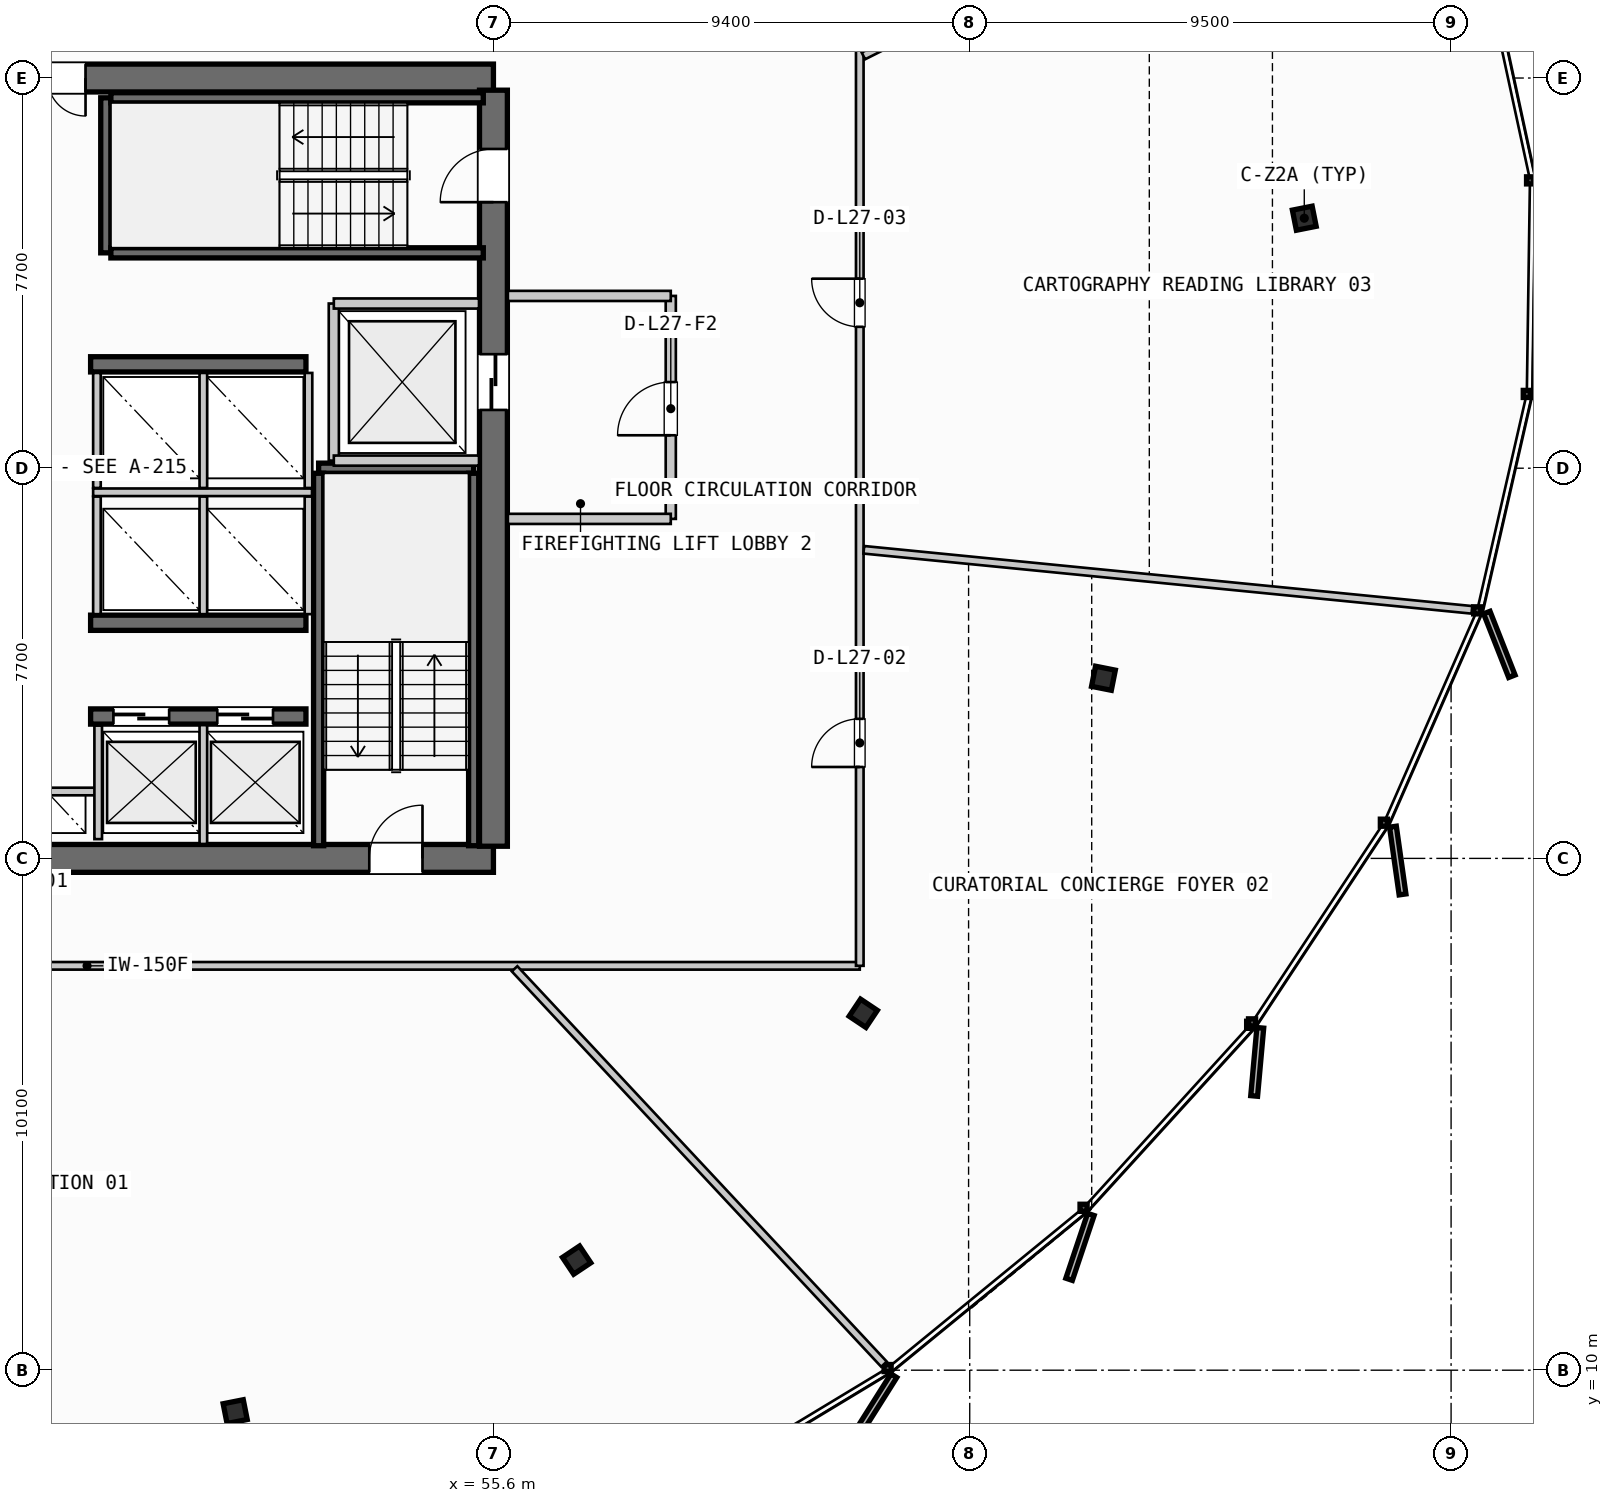
"""IFC4 building model, lengths in metres.
Left out: names, types, materials, properties, quantities, classifications, styles, units other than length and angle.
Written with IfcOpenShell. Run it as: python <this file> out.ifc"""

import sys

from ifc_helpers import new_model, si_unit, direction, frame, frame_2d, origin, origin_2d, place, context, subcontext, project, spatial, rectangle, i_section, extrude, source, transform, mapped, element, fill, save


model = new_model("IFC4")
c1 = context("Model", 3, precision=1e-05, world=origin(), true_north=direction((0.0, 1.0)))
c2 = subcontext(c1, "Body", "Model", "MODEL_VIEW")
j1 = project(units=[si_unit("LENGTHUNIT", "METRE"), si_unit("PLANEANGLEUNIT", "RADIAN")], contexts=[c1])
p1 = place(None, origin())
s1 = spatial("IfcSite", under=j1, at=p1, CompositionType="ELEMENT")
p2 = place(p1, origin())
s2 = spatial("IfcBuilding", under=s1, at=p2, CompositionType="ELEMENT")
p3 = place(p2, frame((0.0, 0.0, 110.8)))
s3 = spatial("IfcBuildingStorey", under=s2, at=p3, CompositionType="ELEMENT", Elevation=110.8)
p4 = place(p3, frame((38.0, 20.1, 0.0), z_axis=(0.0, 0.0, 1.0), x_axis=(1.0, 0.0, 0.0)))
e1 = element("IfcWall", 1, at=p4, inside=s3, PredefinedType="SHEAR", context=c2, shape_type="SweptSolid", body=[
    extrude(rectangle(XDim=17.6, YDim=0.55, at=frame_2d((8.8, 0.0))), origin(), (0.0, 0.0, 1.0), 3.35),
])
p5 = place(p4, frame((1.4, 0.0, 0.0)))
e2 = element("IfcOpeningElement", 2, at=p5, cuts=e1, PredefinedType="OPENING", context=c2, shape_type="SweptSolid", body=[
    extrude(rectangle(XDim=1.05, YDim=2.15, at=frame_2d((0.525, 1.075))), frame((0.0, 0.285, 0.0), z_axis=(0.0, -1.0, 0.0), x_axis=(1.0, 0.0, 0.0)), (0.0, 0.0, 1.0), 0.57),
])
p6 = place(p4, frame((15.15, 0.0, 0.0)))
e3 = element("IfcOpeningElement", 3, at=p6, cuts=e1, PredefinedType="OPENING", context=c2, shape_type="SweptSolid", body=[
    extrude(rectangle(XDim=1.05, YDim=2.15, at=frame_2d((0.525, 1.075))), frame((0.0, 0.285, 0.0), z_axis=(0.0, -1.0, 0.0), x_axis=(1.0, 0.0, 0.0)), (0.0, 0.0, 1.0), 0.57),
])
p7 = place(p3, frame((55.6, 35.5, 0.0), z_axis=(0.0, 0.0, 1.0), x_axis=(-1.0, 0.0, 0.0)))
e4 = element("IfcWall", 4, at=p7, inside=s3, PredefinedType="SHEAR", context=c2, shape_type="SweptSolid", body=[
    extrude(rectangle(XDim=17.6, YDim=0.55, at=frame_2d((8.8, 0.0))), origin(), (0.0, 0.0, 1.0), 3.35),
])
p8 = place(p7, frame((8.05, 0.0, 0.0)))
e5 = element("IfcOpeningElement", 5, at=p8, cuts=e4, PredefinedType="OPENING", context=c2, shape_type="SweptSolid", body=[
    extrude(rectangle(XDim=1.5, YDim=2.2, at=frame_2d((0.75, 1.1))), frame((0.0, 0.285, 0.0), z_axis=(0.0, -1.0, 0.0), x_axis=(1.0, 0.0, 0.0)), (0.0, 0.0, 1.0), 0.57),
])
p9 = place(p7, frame((14.95, 0.0, 0.0)))
e6 = element("IfcOpeningElement", 6, at=p9, cuts=e4, PredefinedType="OPENING", context=c2, shape_type="SweptSolid", body=[
    extrude(rectangle(XDim=1.4, YDim=2.3, at=frame_2d((0.7, 1.15))), frame((0.0, 0.285, 0.0), z_axis=(0.0, -1.0, 0.0), x_axis=(1.0, 0.0, 0.0)), (0.0, 0.0, 1.0), 0.57),
])
p10 = place(p7, frame((12.9, 0.0, 0.0)))
e7 = element("IfcOpeningElement", 7, at=p10, cuts=e4, PredefinedType="OPENING", context=c2, shape_type="SweptSolid", body=[
    extrude(rectangle(XDim=0.9, YDim=2.15, at=frame_2d((0.45, 1.075))), frame((0.0, 0.285, 0.0), z_axis=(0.0, -1.0, 0.0), x_axis=(1.0, 0.0, 0.0)), (0.0, 0.0, 1.0), 0.57),
])
p11 = place(p7, frame((10.6, 0.0, 0.0)))
e8 = element("IfcOpeningElement", 8, at=p11, cuts=e4, PredefinedType="OPENING", context=c2, shape_type="SweptSolid", body=[
    extrude(rectangle(XDim=0.95, YDim=2.15, at=frame_2d((0.475, 1.075))), frame((0.0, 0.285, 0.0), z_axis=(0.0, -1.0, 0.0), x_axis=(1.0, 0.0, 0.0)), (0.0, 0.0, 1.0), 0.57),
])
p12 = place(p3, frame((55.6, 20.34, 0.0), z_axis=(0.0, 0.0, 1.0), x_axis=(0.0, 1.0, 0.0)))
e9 = element("IfcWall", 9, at=p12, inside=s3, PredefinedType="SHEAR", context=c2, shape_type="SweptSolid", body=[
    extrude(rectangle(XDim=14.92, YDim=0.55, at=frame_2d((7.46, 0.0))), origin(), (0.0, 0.0, 1.0), 3.35),
])
p13 = place(p12, frame((12.71, 0.0, 0.0)))
e10 = element("IfcOpeningElement", 10, at=p13, cuts=e9, PredefinedType="OPENING", context=c2, shape_type="SweptSolid", body=[
    extrude(rectangle(XDim=1.05, YDim=2.15, at=frame_2d((0.525, 1.075))), frame((0.0, 0.285, 0.0), z_axis=(0.0, -1.0, 0.0), x_axis=(1.0, 0.0, 0.0)), (0.0, 0.0, 1.0), 0.57),
])
p14 = place(p12, frame((8.61, 0.0, 0.0)))
e11 = element("IfcOpeningElement", 11, at=p14, cuts=e9, PredefinedType="OPENING", context=c2, shape_type="SweptSolid", body=[
    extrude(rectangle(XDim=1.1, YDim=2.2, at=frame_2d((0.55, 1.1))), frame((0.0, 0.285, 0.0), z_axis=(0.0, -1.0, 0.0), x_axis=(1.0, 0.0, 0.0)), (0.0, 0.0, 1.0), 0.57),
])
p15 = place(p3, frame((47.65, 22.9, 0.0), z_axis=(0.0, 0.0, 1.0), x_axis=(1.0, 0.0, 0.0)))
e12 = element("IfcWall", 12, at=p15, inside=s3, PredefinedType="SHEAR", context=c2, shape_type="SweptSolid", body=[
    extrude(rectangle(XDim=4.25, YDim=0.3, at=frame_2d((2.125, 0.0))), origin(), (0.0, 0.0, 1.0), 3.35),
])
p16 = place(p15, frame((0.45, 0.0, 0.0)))
e13 = element("IfcOpeningElement", 13, at=p16, cuts=e12, PredefinedType="OPENING", context=c2, shape_type="SweptSolid", body=[
    extrude(rectangle(XDim=1.1, YDim=2.2, at=frame_2d((0.55, 1.1))), frame((0.0, 0.16, 0.0), z_axis=(0.0, -1.0, 0.0), x_axis=(1.0, 0.0, 0.0)), (0.0, 0.0, 1.0), 0.32),
])
p17 = place(p15, frame((2.5, 0.0, 0.0)))
e14 = element("IfcOpeningElement", 14, at=p17, cuts=e12, PredefinedType="OPENING", context=c2, shape_type="SweptSolid", body=[
    extrude(rectangle(XDim=1.1, YDim=2.2, at=frame_2d((0.55, 1.1))), frame((0.0, 0.16, 0.0), z_axis=(0.0, -1.0, 0.0), x_axis=(1.0, 0.0, 0.0)), (0.0, 0.0, 1.0), 0.32),
])
for number, where, z_axis, x_axis in (
    (15, (47.65, 24.75, 0.0), (0.0, 0.0, 1.0), (1.0, 0.0, 0.0)),
    (16, (47.65, 29.85, 0.0), (0.0, 0.0, 1.0), (1.0, 0.0, 0.0)),
):
    element("IfcWall", number, at=place(p3, frame(where, z_axis=z_axis, x_axis=x_axis)), inside=s3, PredefinedType="SHEAR", context=c2, shape_type="SweptSolid", body=[
        extrude(rectangle(XDim=4.25, YDim=0.3, at=frame_2d((2.125, 0.0))), origin(), (0.0, 0.0, 1.0), 3.35),
    ])
m1 = source(origin(), c2, "Body", "SweptSolid", [
    extrude(i_section(OverallWidth=0.405, OverallDepth=0.398, WebThickness=0.035, FlangeThickness=0.056, FilletRadius=0.015, at=origin_2d()), origin(), (0.0, 0.0, 1.0), 3.35),
])
for number, where, z_axis, x_axis in (
    (17, (71.603, 32.733, 0.0), (0.0, 0.0, 1.0), (0.981, 0.195, 0.0)),
    (18, (50.503, 9.182, 0.0), (0.0, 0.0, 1.0), (0.195, -0.981, 0.0)),
    (19, (57.242, 12.172, 0.0), (0.0, 0.0, 1.0), (0.556, -0.831, 0.0)),
    (20, (62.899, 17.043, 0.0), (0.0, 0.0, 1.0), (0.831, -0.556, 0.0)),
    (21, (67.639, 23.655, 0.0), (0.0, 0.0, 1.0), (0.981, -0.195, 0.0)),
):
    element("IfcColumn", number, at=place(p3, frame(where, z_axis=z_axis, x_axis=x_axis)), inside=s3, PredefinedType="COLUMN", context=c2, shape_type="MappedRepresentation", body=[
        mapped(m1, transform((0.0, 0.0, 0.0), scale=1.0)),
    ])
p18 = place(p3, frame((52.15, 27.8, 0.0), z_axis=(0.0, 0.0, 1.0), x_axis=(1.0, 0.0, 0.0)))
e22 = element("IfcWall", 22, at=p18, inside=s3, PredefinedType="SHEAR", context=c2, shape_type="SweptSolid", body=[
    extrude(rectangle(XDim=3.06, YDim=0.2, at=frame_2d((1.53, 0.0))), origin(), (0.0, 0.0, 1.0), 3.35),
])
for number, where, z_axis, x_axis in (
    (23, (55.21, 27.7, 0.0), (0.0, 0.0, 1.0), (0.0, -1.0, 0.0)),
    (24, (52.15, 20.35, 0.0), (0.0, 0.0, 1.0), (0.0, 1.0, 0.0)),
):
    element("IfcWall", number, at=place(p3, frame(where, z_axis=z_axis, x_axis=x_axis)), inside=s3, PredefinedType="SHEAR", context=c2, shape_type="SweptSolid", body=[
        extrude(rectangle(XDim=7.35, YDim=0.2, at=frame_2d((3.675, 0.0))), origin(), (0.0, 0.0, 1.0), 3.35),
    ])
p19 = place(p3, frame((47.95, 32.05, 0.0), z_axis=(0.0, 0.0, 1.0), x_axis=(0.0, 1.0, 0.0)))
e25 = element("IfcWall", 25, at=p19, inside=s3, PredefinedType="SHEAR", context=c2, shape_type="SweptSolid", body=[
    extrude(rectangle(XDim=3.06, YDim=0.2, at=frame_2d((1.53, 0.0))), origin(), (0.0, 0.0, 1.0), 3.35),
])
for number, where, z_axis, x_axis in (
    (26, (48.05, 35.11, 0.0), (0.0, 0.0, 1.0), (1.0, 0.0, 0.0)),
    (27, (55.4, 32.05, 0.0), (0.0, 0.0, 1.0), (-1.0, 0.0, 0.0)),
):
    element("IfcWall", number, at=place(p3, frame(where, z_axis=z_axis, x_axis=x_axis)), inside=s3, PredefinedType="SHEAR", context=c2, shape_type="SweptSolid", body=[
        extrude(rectangle(XDim=7.35, YDim=0.2, at=frame_2d((3.675, 0.0))), origin(), (0.0, 0.0, 1.0), 3.35),
    ])
p20 = place(p3, frame((45.8, 21.42, 0.0), z_axis=(0.0, 0.0, 1.0), x_axis=(1.0, 0.0, 0.0)))
e28 = element("IfcWall", 28, at=p20, inside=s3, PredefinedType="PARTITIONING", context=c2, shape_type="SweptSolid", body=[
    extrude(rectangle(XDim=2.0, YDim=0.15, at=frame_2d((1.0, 0.0))), origin(), (0.0, 0.0, 1.0), 2.28),
])
p21 = place(p3, frame((47.8, 20.48, 0.0), z_axis=(0.0, 0.0, 1.0), x_axis=(0.0, 1.0, 0.0)))
e29 = element("IfcWall", 29, at=p21, inside=s3, PredefinedType="PARTITIONING", context=c2, shape_type="SweptSolid", body=[
    extrude(rectangle(XDim=2.24, YDim=0.15, at=frame_2d((1.12, 0.0))), origin(), (0.0, 0.0, 1.0), 2.28),
])
p22 = place(p3, frame((52.45, 27.95, 0.0), z_axis=(0.0, 0.0, 1.0), x_axis=(0.0, 1.0, 0.0)))
e30 = element("IfcWall", 30, at=p22, inside=s3, PredefinedType="PARTITIONING", context=c2, shape_type="SweptSolid", body=[
    extrude(rectangle(XDim=3.1, YDim=0.2, at=frame_2d((1.55, 0.0))), origin(), (0.0, 0.0, 1.0), 2.28),
])
for number, where, z_axis, x_axis in (
    (31, (52.45, 27.95, 0.0), (0.0, 0.0, 1.0), (1.0, 0.0, 0.0)),
    (32, (52.45, 31.05, 0.0), (0.0, 0.0, 1.0), (1.0, 0.0, 0.0)),
):
    element("IfcWall", number, at=place(p3, frame(where, z_axis=z_axis, x_axis=x_axis)), inside=s3, PredefinedType="PARTITIONING", context=c2, shape_type="SweptSolid", body=[
        extrude(rectangle(XDim=2.865, YDim=0.2, at=frame_2d((1.433, 0.0))), origin(), (0.0, 0.0, 1.0), 2.28),
    ])
p23 = place(p3, frame((59.1, 26.8, 0.0), z_axis=(0.0, 0.0, 1.0), x_axis=(0.0, 1.0, 0.0)))
e33 = element("IfcWall", 33, at=p23, inside=s3, PredefinedType="PARTITIONING", context=c2, shape_type="SweptSolid", body=[
    extrude(rectangle(XDim=4.4, YDim=0.2, at=frame_2d((2.2, 0.0))), origin(), (0.0, 0.0, 1.0), 2.28),
])
p24 = place(p23, frame((1.65, 0.0, 0.0)))
e34 = element("IfcOpeningElement", 34, at=p24, cuts=e33, PredefinedType="OPENING", context=c2, shape_type="SweptSolid", body=[
    extrude(rectangle(XDim=1.05, YDim=2.15, at=frame_2d((0.525, 1.075))), frame((0.0, 0.11, 0.0), z_axis=(0.0, -1.0, 0.0), x_axis=(1.0, 0.0, 0.0)), (0.0, 0.0, 1.0), 0.22),
])
for number, where, z_axis, x_axis in (
    (35, (55.885, 26.8, 0.0), (0.0, 0.0, 1.0), (1.0, 0.0, 0.0)),
    (36, (55.885, 31.2, 0.0), (0.0, 0.0, 1.0), (1.0, 0.0, 0.0)),
):
    element("IfcWall", number, at=place(p3, frame(where, z_axis=z_axis, x_axis=x_axis)), inside=s3, PredefinedType="PARTITIONING", context=c2, shape_type="SweptSolid", body=[
        extrude(rectangle(XDim=3.215, YDim=0.2, at=frame_2d((1.607, 0.0))), origin(), (0.0, 0.0, 1.0), 2.28),
    ])
p25 = place(p3, frame((49.875, 20.385, 0.0), z_axis=(0.0, 0.0, 1.0), x_axis=(0.0, 1.0, 0.0)))
e37 = element("IfcWall", 37, at=p25, inside=s3, PredefinedType="PARTITIONING", context=c2, shape_type="SweptSolid", body=[
    extrude(rectangle(XDim=2.345, YDim=0.15, at=frame_2d((1.172, 0.0))), origin(), (0.0, 0.0, 1.0), 2.28),
])
p26 = place(p3, frame((47.7, 27.325, 0.0), z_axis=(0.0, 0.0, 1.0), x_axis=(1.0, 0.0, 0.0)))
e38 = element("IfcWall", 38, at=p26, inside=s3, PredefinedType="PARTITIONING", context=c2, shape_type="SweptSolid", body=[
    extrude(rectangle(XDim=4.32, YDim=0.15, at=frame_2d((2.16, 0.0))), origin(), (0.0, 0.0, 1.0), 2.28),
])
for number, where, z_axis, x_axis in (
    (39, (47.775, 24.92, 0.0), (0.0, 0.0, 1.0), (0.0, 1.0, 0.0)),
    (40, (49.875, 24.92, 0.0), (0.0, 0.0, 1.0), (0.0, 1.0, 0.0)),
    (41, (51.95, 24.92, 0.0), (0.0, 0.0, 1.0), (0.0, 1.0, 0.0)),
):
    element("IfcWall", number, at=place(p3, frame(where, z_axis=z_axis, x_axis=x_axis)), inside=s3, PredefinedType="PARTITIONING", context=c2, shape_type="SweptSolid", body=[
        extrude(rectangle(XDim=2.32, YDim=0.15, at=frame_2d((1.16, 0.0))), origin(), (0.0, 0.0, 1.0), 2.28),
    ])
for number, where, z_axis, x_axis in (
    (42, (47.775, 27.41, 0.0), (0.0, 0.0, 1.0), (0.0, 1.0, 0.0)),
    (43, (49.875, 27.41, 0.0), (0.0, 0.0, 1.0), (0.0, 1.0, 0.0)),
    (44, (51.95, 27.41, 0.0), (0.0, 0.0, 1.0), (0.0, 1.0, 0.0)),
):
    element("IfcWall", number, at=place(p3, frame(where, z_axis=z_axis, x_axis=x_axis)), inside=s3, PredefinedType="PARTITIONING", context=c2, shape_type="SweptSolid", body=[
        extrude(rectangle(XDim=2.27, YDim=0.15, at=frame_2d((1.135, 0.0))), origin(), (0.0, 0.0, 1.0), 2.28),
    ])
p27 = place(p3, frame((32.33, 17.98, 0.0), z_axis=(0.0, 0.0, 1.0), x_axis=(1.0, 0.0, 0.0)))
e45 = element("IfcWall", 45, at=p27, inside=s3, PredefinedType="PARTITIONING", context=c2, shape_type="SweptSolid", body=[
    extrude(rectangle(XDim=30.5, YDim=0.15, at=frame_2d((15.25, 0.0))), origin(), (0.0, 0.0, 1.0), 2.28),
])
p28 = place(p27, frame((13.482, 0.0, 0.0)))
e46 = element("IfcOpeningElement", 46, at=p28, cuts=e45, PredefinedType="OPENING", context=c2, shape_type="SweptSolid", body=[
    extrude(rectangle(XDim=0.95, YDim=2.15, at=frame_2d((0.475, 1.075))), frame((0.0, 0.085, 0.0), z_axis=(0.0, -1.0, 0.0), x_axis=(1.0, 0.0, 0.0)), (0.0, 0.0, 1.0), 0.17),
])
p29 = place(p3, frame((62.83, 17.98, 0.0), z_axis=(0.0, 0.0, 1.0), x_axis=(0.0, 1.0, 0.0)))
e47 = element("IfcWall", 47, at=p29, inside=s3, PredefinedType="PARTITIONING", context=c2, shape_type="SweptSolid", body=[
    extrude(rectangle(XDim=19.22, YDim=0.15, at=frame_2d((9.61, 0.0))), origin(), (0.0, 0.0, 1.0), 2.28),
])
p30 = place(p29, frame((3.924, 0.0, 0.0)))
e48 = element("IfcOpeningElement", 48, at=p30, cuts=e47, PredefinedType="OPENING", context=c2, shape_type="SweptSolid", body=[
    extrude(rectangle(XDim=0.95, YDim=2.15, at=frame_2d((0.475, 1.075))), frame((0.0, 0.085, 0.0), z_axis=(0.0, -1.0, 0.0), x_axis=(1.0, 0.0, 0.0)), (0.0, 0.0, 1.0), 0.17),
])
p31 = place(p29, frame((12.61, 0.0, 0.0)))
e49 = element("IfcOpeningElement", 49, at=p31, cuts=e47, PredefinedType="OPENING", context=c2, shape_type="SweptSolid", body=[
    extrude(rectangle(XDim=0.95, YDim=2.15, at=frame_2d((0.475, 1.075))), frame((0.0, 0.085, 0.0), z_axis=(0.0, -1.0, 0.0), x_axis=(1.0, 0.0, 0.0)), (0.0, 0.0, 1.0), 0.17),
])
p32 = place(p3, frame((56.017, 17.921, 0.0), z_axis=(0.0, 0.0, 1.0), x_axis=(0.682716489206, -0.730683375592, 0.0)))
e50 = element("IfcWall", 50, at=p32, inside=s3, PredefinedType="PARTITIONING", context=c2, shape_type="SweptSolid", body=[
    extrude(rectangle(XDim=10.678, YDim=0.15, at=frame_2d((5.339, 0.0))), origin(), (0.0, 0.0, 1.0), 2.28),
])
p33 = place(p3, frame((62.91, 26.19, 0.0), z_axis=(0.0, 0.0, 1.0), x_axis=(0.995158113717, -0.098286971176, 0.0)))
e51 = element("IfcWall", 51, at=p33, inside=s3, PredefinedType="PARTITIONING", context=c2, shape_type="SweptSolid", body=[
    extrude(rectangle(XDim=12.06, YDim=0.15, at=frame_2d((6.03, 0.0))), origin(), (0.0, 0.0, 1.0), 2.28),
])
p34 = place(p3, frame((62.902, 35.936, 0.0), z_axis=(0.0, 0.0, 1.0), x_axis=(0.893411700763, 0.449238837302, 0.0)))
e52 = element("IfcWall", 52, at=p34, inside=s3, PredefinedType="PARTITIONING", context=c2, shape_type="SweptSolid", body=[
    extrude(rectangle(XDim=11.663, YDim=0.15, at=frame_2d((5.831, 0.0))), origin(), (0.0, 0.0, 1.0), 2.28),
])
m2 = source(origin(), c2, "Body", "SweptSolid", [
    extrude(rectangle(XDim=1.05, YDim=2.15, at=frame_2d((0.525, 1.075))), frame((0.0, 0.025, 0.0), z_axis=(0.0, -1.0, 0.0), x_axis=(1.0, 0.0, 0.0)), (0.0, 0.0, 1.0), 0.05),
])
p35 = place(p6, origin())
e53 = element("IfcDoor", 53, at=p35, inside=s3, OperationType="SINGLE_SWING_RIGHT", PredefinedType="DOOR", context=c2, shape_type="MappedRepresentation", body=[
    mapped(m2, transform((0.0, 0.0, 0.0), scale=1.0)),
])
fill(e3, e53)
p36 = place(p13, origin())
e54 = element("IfcDoor", 54, at=p36, inside=s3, OperationType="SINGLE_SWING_LEFT", PredefinedType="DOOR", context=c2, shape_type="MappedRepresentation", body=[
    mapped(m2, transform((0.0, 0.0, 0.0), scale=1.0)),
])
fill(e10, e54)
m3 = source(origin(), c2, "Body", "SweptSolid", [
    extrude(rectangle(XDim=1.5, YDim=2.2, at=frame_2d((0.75, 1.1))), frame((0.0, 0.025, 0.0), z_axis=(0.0, -1.0, 0.0), x_axis=(1.0, 0.0, 0.0)), (0.0, 0.0, 1.0), 0.05),
])
p37 = place(p8, origin())
e55 = element("IfcDoor", 55, at=p37, inside=s3, OperationType="DOUBLE_DOOR_SINGLE_SWING", PredefinedType="DOOR", context=c2, shape_type="MappedRepresentation", body=[
    mapped(m3, transform((0.0, 0.0, 0.0), scale=1.0)),
])
fill(e5, e55)
m4 = source(origin(), c2, "Body", "SweptSolid", [
    extrude(rectangle(XDim=1.1, YDim=2.2, at=frame_2d((0.55, 1.1))), frame((0.0, 0.025, 0.0), z_axis=(0.0, -1.0, 0.0), x_axis=(1.0, 0.0, 0.0)), (0.0, 0.0, 1.0), 0.05),
])
p38 = place(p14, origin())
e56 = element("IfcDoor", 56, at=p38, inside=s3, OperationType="SLIDING_TO_RIGHT", PredefinedType="DOOR", context=c2, shape_type="MappedRepresentation", body=[
    mapped(m4, transform((0.0, 0.0, 0.0), scale=1.0)),
])
fill(e11, e56)
p39 = place(p16, origin())
e57 = element("IfcDoor", 57, at=p39, inside=s3, OperationType="SLIDING_TO_LEFT", PredefinedType="DOOR", context=c2, shape_type="MappedRepresentation", body=[
    mapped(m4, transform((0.0, 0.0, 0.0), scale=1.0)),
])
fill(e13, e57)
p40 = place(p17, origin())
e58 = element("IfcDoor", 58, at=p40, inside=s3, OperationType="SLIDING_TO_LEFT", PredefinedType="DOOR", context=c2, shape_type="MappedRepresentation", body=[
    mapped(m4, transform((0.0, 0.0, 0.0), scale=1.0)),
])
fill(e14, e58)
p41 = place(p24, origin())
e59 = element("IfcDoor", 59, at=p41, inside=s3, OperationType="SINGLE_SWING_LEFT", PredefinedType="DOOR", context=c2, shape_type="MappedRepresentation", body=[
    mapped(m2, transform((0.0, 0.0, 0.0), scale=1.0)),
])
fill(e34, e59)
m5 = source(origin(), c2, "Body", "SweptSolid", [
    extrude(rectangle(XDim=0.95, YDim=2.15, at=frame_2d((0.475, 1.075))), frame((0.0, 0.025, 0.0), z_axis=(0.0, -1.0, 0.0), x_axis=(1.0, 0.0, 0.0)), (0.0, 0.0, 1.0), 0.05),
])
p42 = place(p30, origin())
e60 = element("IfcDoor", 60, at=p42, inside=s3, OperationType="SINGLE_SWING_LEFT", PredefinedType="DOOR", context=c2, shape_type="MappedRepresentation", body=[
    mapped(m5, transform((0.0, 0.0, 0.0), scale=1.0)),
])
fill(e48, e60)
p43 = place(p31, origin())
e61 = element("IfcDoor", 61, at=p43, inside=s3, OperationType="SINGLE_SWING_RIGHT", PredefinedType="DOOR", context=c2, shape_type="MappedRepresentation", body=[
    mapped(m5, transform((0.0, 0.0, 0.0), scale=1.0)),
])
fill(e49, e61)
save(model, sys.argv[1])
